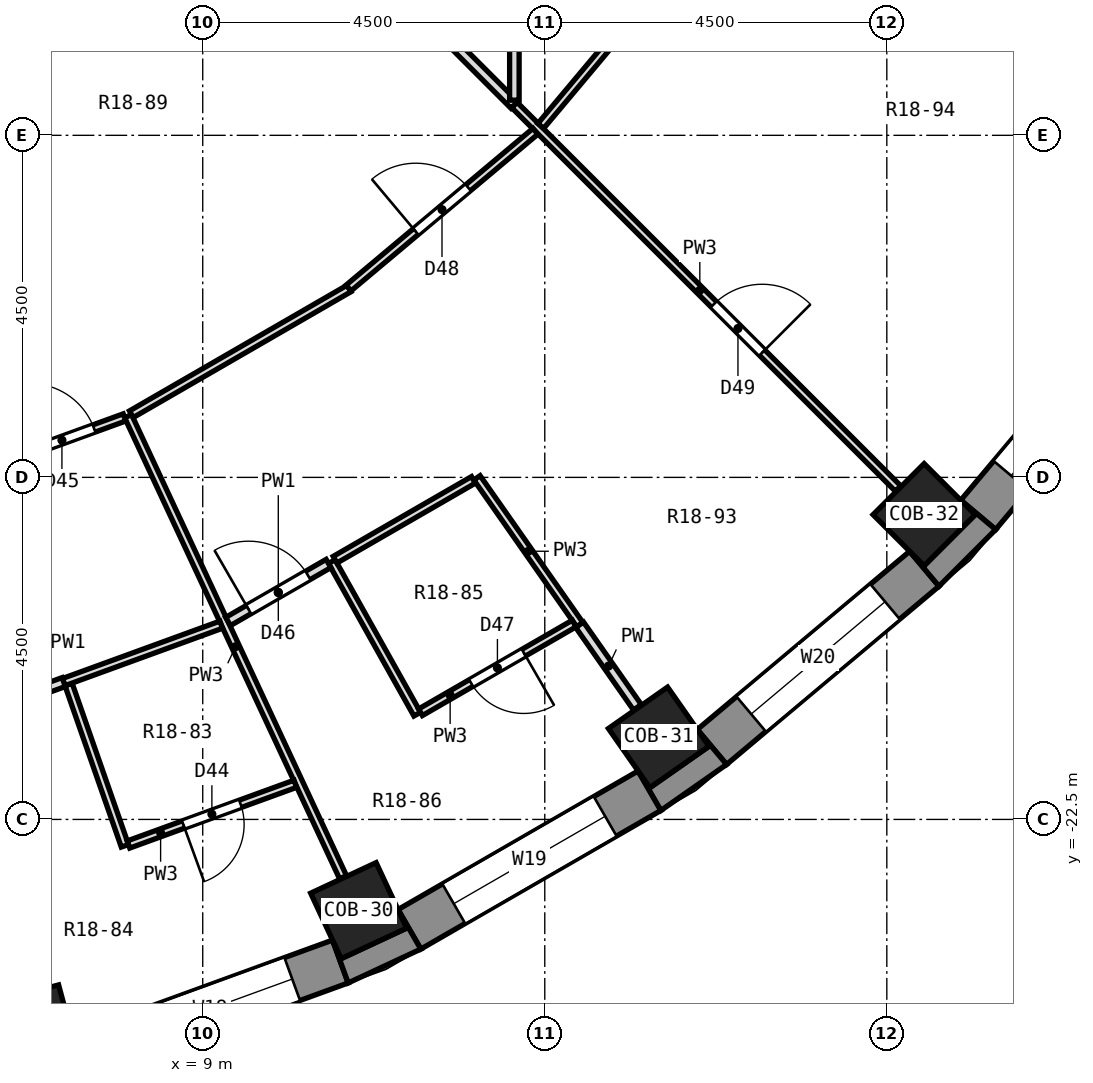
"""IFC4 building model, lengths in metres.
Left out: names, types, materials, properties, quantities, classifications, styles, units other than length and angle.
Written with IfcOpenShell. Run it as: python <this file> out.ifc"""

import sys

from ifc_helpers import new_model, si_unit, direction, frame, frame_2d, origin, origin_2d, place, context, subcontext, project, spatial, polyline, rectangle, outline, extrude, element, fill, save


model = new_model("IFC4")
c1 = context("Model", 3, precision=1e-05, world=origin(), true_north=direction((0.0, 1.0)))
c2 = subcontext(c1, "Body", "Model", "MODEL_VIEW")
j1 = project(units=[si_unit("LENGTHUNIT", "METRE"), si_unit("PLANEANGLEUNIT", "RADIAN")], contexts=[c1])
p1 = place(None, origin())
s1 = spatial("IfcSite", under=j1, at=p1, CompositionType="ELEMENT")
p2 = place(p1, origin())
s2 = spatial("IfcBuilding", under=s1, at=p2, CompositionType="ELEMENT")
p3 = place(p2, frame((0.0, 0.0, 101.8)))
s3 = spatial("IfcBuildingStorey", under=s2, at=p3, CompositionType="ELEMENT", Elevation=101.8)
for number, where, z_axis, x_axis in (
    (1, (6.768, -25.259, 0.0), (0.0, 0.0, 1.0), (0.259, -0.966, 0.0)),
    (2, (11.052, -23.7, 0.0), (0.0, 0.0, 1.0), (0.423, -0.906, 0.0)),
    (3, (14.999, -21.421, 0.0), (0.0, 0.0, 1.0), (0.574, -0.819, 0.0)),
    (4, (18.491, -18.491, 0.0), (0.0, 0.0, 1.0), (0.707, -0.707, 0.0)),
):
    element("IfcColumn", number, at=place(p3, frame(where, z_axis=z_axis, x_axis=x_axis)), inside=s3, PredefinedType="COLUMN", context=c2, shape_type="SweptSolid", body=[
        extrude(rectangle(XDim=0.95, YDim=0.95, at=origin_2d()), origin(), (0.0, 0.0, 1.0), 3.3),
    ])
p4 = place(p3, frame((7.383, -25.617, 0.0), z_axis=(0.0, 0.0, 1.0), x_axis=(0.939703505393, 0.341990236633, 0.0)))
e5 = element("IfcWall", 5, at=p4, inside=s3, PredefinedType="SOLIDWALL", context=c2, shape_type="SweptSolid", body=[
    extrude(rectangle(XDim=3.648, YDim=0.6, at=frame_2d((1.824, 0.0))), origin(), (0.0, 0.0, 1.0), 2.8),
])
p5 = place(p4, frame((0.674, 0.0, 0.9)))
e6 = element("IfcOpeningElement", 6, at=p5, cuts=e5, PredefinedType="OPENING", context=c2, shape_type="SweptSolid", body=[
    extrude(rectangle(XDim=2.3, YDim=1.8, at=frame_2d((1.15, 0.9))), frame((0.0, 0.312, 0.0), z_axis=(0.0, -1.0, 0.0), x_axis=(1.0, 0.0, 0.0)), (0.0, 0.0, 1.0), 0.624),
])
p6 = place(p3, frame((11.719, -23.946, 0.0), z_axis=(0.0, 0.0, 1.0), x_axis=(0.866051847062, 0.499954196102, 0.0)))
e7 = element("IfcWall", 7, at=p6, inside=s3, PredefinedType="SOLIDWALL", context=c2, shape_type="SweptSolid", body=[
    extrude(rectangle(XDim=3.648, YDim=0.6, at=frame_2d((1.824, 0.0))), origin(), (0.0, 0.0, 1.0), 2.8),
])
p7 = place(p6, frame((0.674, 0.0, 0.9)))
e8 = element("IfcOpeningElement", 8, at=p7, cuts=e7, PredefinedType="OPENING", context=c2, shape_type="SweptSolid", body=[
    extrude(rectangle(XDim=2.3, YDim=1.8, at=frame_2d((1.15, 0.9))), frame((0.0, 0.312, 0.0), z_axis=(0.0, -1.0, 0.0), x_axis=(1.0, 0.0, 0.0)), (0.0, 0.0, 1.0), 0.624),
])
p8 = place(p3, frame((15.699, -21.547, 0.0), z_axis=(0.0, 0.0, 1.0), x_axis=(0.766055462616, 0.642774476932, 0.0)))
e9 = element("IfcWall", 9, at=p8, inside=s3, PredefinedType="SOLIDWALL", context=c2, shape_type="SweptSolid", body=[
    extrude(rectangle(XDim=3.648, YDim=0.6, at=frame_2d((1.824, 0.0))), origin(), (0.0, 0.0, 1.0), 2.8),
])
p9 = place(p8, frame((0.674, 0.0, 0.9)))
e10 = element("IfcOpeningElement", 10, at=p9, cuts=e9, PredefinedType="OPENING", context=c2, shape_type="SweptSolid", body=[
    extrude(rectangle(XDim=2.3, YDim=1.8, at=frame_2d((1.15, 0.9))), frame((0.0, 0.312, 0.0), z_axis=(0.0, -1.0, 0.0), x_axis=(1.0, 0.0, 0.0)), (0.0, 0.0, 1.0), 0.624),
])
p10 = place(p3, frame((19.202, -18.494, 0.0), z_axis=(0.0, 0.0, 1.0), x_axis=(0.642774476932, 0.766055462616, 0.0)))
e11 = element("IfcWall", 11, at=p10, inside=s3, PredefinedType="SOLIDWALL", context=c2, shape_type="SweptSolid", body=[
    extrude(rectangle(XDim=3.648, YDim=0.6, at=frame_2d((1.824, 0.0))), origin(), (0.0, 0.0, 1.0), 2.8),
])
p11 = place(p10, frame((0.674, 0.0, 0.9)))
e12 = element("IfcOpeningElement", 12, at=p11, cuts=e11, PredefinedType="OPENING", context=c2, shape_type="SweptSolid", body=[
    extrude(rectangle(XDim=2.3, YDim=1.8, at=frame_2d((1.15, 0.9))), frame((0.0, 0.312, 0.0), z_axis=(0.0, -1.0, 0.0), x_axis=(1.0, 0.0, 0.0)), (0.0, 0.0, 1.0), 0.624),
])
p12 = place(p3, origin())
e13 = element("IfcWall", 13, at=p12, inside=s3, PredefinedType="SOLIDWALL", context=c2, shape_type="SweptSolid", body=[
    extrude(outline(polyline([(10.913, -24.651), (11.869, -24.206), (11.569, -23.686), (11.683, -23.93), (10.822, -24.331), (10.708, -24.087), (10.913, -24.651)])), origin(), (0.0, 0.0, 1.0), 2.8),
])
p13 = place(p3, origin())
e14 = element("IfcWall", 14, at=p13, inside=s3, PredefinedType="SOLIDWALL", context=c2, shape_type="SweptSolid", body=[
    extrude(outline(polyline([(15.892, -21.777), (15.506, -21.317), (15.661, -21.538), (14.882, -22.083), (14.728, -21.862), (15.028, -22.382), (15.892, -21.777)])), origin(), (0.0, 0.0, 1.0), 2.8),
])
p14 = place(p3, origin())
e15 = element("IfcWall", 15, at=p14, inside=s3, PredefinedType="SOLIDWALL", context=c2, shape_type="SweptSolid", body=[
    extrude(outline(polyline([(18.686, -19.432), (19.432, -18.686), (18.972, -18.301), (19.163, -18.491), (18.491, -19.163), (18.301, -18.972), (18.686, -19.432)])), origin(), (0.0, 0.0, 1.0), 2.8),
])
p15 = place(p3, frame((7.234, -20.723, 0.0), z_axis=(0.0, 0.0, 1.0), x_axis=(0.329707399535, -0.944083169372, 0.0)))
e16 = element("IfcWall", 16, at=p15, inside=s3, PredefinedType="PARTITIONING", context=c2, shape_type="SweptSolid", body=[
    extrude(rectangle(XDim=2.25, YDim=0.1, at=frame_2d((1.125, 0.0))), origin(), (0.0, 0.0, 1.0), 2.8),
])
p16 = place(p3, frame((8.018, -17.194, 0.0), z_axis=(0.0, 0.0, 1.0), x_axis=(0.422490057257, -0.906367558731, 0.0)))
e17 = element("IfcWall", 17, at=p16, inside=s3, PredefinedType="PARTITIONING", context=c2, shape_type="SweptSolid", body=[
    extrude(rectangle(XDim=6.693, YDim=0.1, at=frame_2d((3.347, 0.0))), origin(), (0.0, 0.0, 1.0), 2.8),
])
p17 = place(p3, frame((10.698, -19.108, 0.0), z_axis=(0.0, 0.0, 1.0), x_axis=(0.488622759198, -0.872495157117, 0.0)))
e18 = element("IfcWall", 18, at=p17, inside=s3, PredefinedType="PARTITIONING", context=c2, shape_type="SweptSolid", body=[
    extrude(rectangle(XDim=2.3, YDim=0.1, at=frame_2d((1.15, 0.0))), origin(), (0.0, 0.0, 1.0), 2.8),
])
p18 = place(p3, frame((12.608, -18.006, 0.0), z_axis=(0.0, 0.0, 1.0), x_axis=(0.573573515593, -0.819154089418, 0.0)))
e19 = element("IfcWall", 19, at=p18, inside=s3, PredefinedType="PARTITIONING", context=c2, shape_type="SweptSolid", body=[
    extrude(rectangle(XDim=2.358, YDim=0.1, at=frame_2d((1.179, 0.0))), origin(), (0.0, 0.0, 1.0), 2.8),
])
p19 = place(p3, frame((13.958, -19.939, 0.0), z_axis=(0.0, 0.0, 1.0), x_axis=(0.573511785482, -0.819197309513, 0.0)))
e20 = element("IfcWall", 20, at=p19, inside=s3, PredefinedType="PARTITIONING", context=c2, shape_type="SweptSolid", body=[
    extrude(rectangle(XDim=1.326, YDim=0.125, at=frame_2d((0.663, 0.0))), origin(), (0.0, 0.0, 1.0), 2.8),
])
p20 = place(p3, frame((13.1, -13.1, 0.0), z_axis=(0.0, 0.0, 1.0), x_axis=(0.707192272448, -0.707021279588, 0.0)))
e21 = element("IfcWall", 21, at=p20, inside=s3, PredefinedType="PARTITIONING", context=c2, shape_type="SweptSolid", body=[
    extrude(rectangle(XDim=7.139, YDim=0.1, at=frame_2d((3.569, 0.0))), origin(), (0.0, 0.0, 1.0), 2.8),
])
p21 = place(p20, frame((3.71, 0.0, 0.0)))
e22 = element("IfcOpeningElement", 22, at=p21, cuts=e21, PredefinedType="OPENING", context=c2, shape_type="SweptSolid", body=[
    extrude(rectangle(XDim=0.9, YDim=2.1, at=frame_2d((0.45, 1.05))), frame((0.0, 0.062, 0.0), z_axis=(0.0, -1.0, 0.0), x_axis=(1.0, 0.0, 0.0)), (0.0, 0.0, 1.0), 0.124),
])
p22 = place(p3, frame((8.092, -8.092, 0.0), z_axis=(0.0, 0.0, 1.0), x_axis=(0.707106781187, -0.707106781187, 0.0)))
e23 = element("IfcWall", 23, at=p22, inside=s3, PredefinedType="PARTITIONING", context=c2, shape_type="SweptSolid", body=[
    extrude(rectangle(XDim=7.083, YDim=0.125, at=frame_2d((3.541, 0.0))), origin(), (0.0, 0.0, 1.0), 2.8),
])
p23 = place(p3, frame((8.023, -22.83, 0.0), z_axis=(0.0, 0.0, 1.0), x_axis=(0.939707949959, 0.341978023831, 0.0)))
e24 = element("IfcWall", 24, at=p23, inside=s3, PredefinedType="PARTITIONING", context=c2, shape_type="SweptSolid", body=[
    extrude(rectangle(XDim=2.336, YDim=0.1, at=frame_2d((1.168, 0.0))), origin(), (0.0, 0.0, 1.0), 2.8),
])
p24 = place(p23, frame((0.768, 0.0, 0.0)))
e25 = element("IfcOpeningElement", 25, at=p24, cuts=e24, PredefinedType="OPENING", context=c2, shape_type="SweptSolid", body=[
    extrude(rectangle(XDim=0.8, YDim=2.1, at=frame_2d((0.4, 1.05))), frame((0.0, 0.062, 0.0), z_axis=(0.0, -1.0, 0.0), x_axis=(1.0, 0.0, 0.0)), (0.0, 0.0, 1.0), 0.124),
])
p25 = place(p3, frame((7.171, -20.693, 0.0), z_axis=(0.0, 0.0, 1.0), x_axis=(0.939573404597, 0.342347509665, 0.0)))
e26 = element("IfcWall", 26, at=p25, inside=s3, PredefinedType="PARTITIONING", context=c2, shape_type="SweptSolid", body=[
    extrude(rectangle(XDim=2.205, YDim=0.1, at=frame_2d((1.103, 0.0))), origin(), (0.0, 0.0, 1.0), 2.8),
])
p26 = place(p3, frame((5.736, -21.215, 0.0), z_axis=(0.0, 0.0, 1.0), x_axis=(0.939798092341, 0.34173022347, 0.0)))
e27 = element("IfcWall", 27, at=p26, inside=s3, PredefinedType="PARTITIONING", context=c2, shape_type="SweptSolid", body=[
    extrude(rectangle(XDim=1.527, YDim=0.125, at=frame_2d((0.763, 0.0))), origin(), (0.0, 0.0, 1.0), 2.8),
])
p27 = place(p26, frame((0.314, 0.0, 0.0)))
e28 = element("IfcOpeningElement", 28, at=p27, cuts=e27, PredefinedType="OPENING", context=c2, shape_type="SweptSolid", body=[
    extrude(rectangle(XDim=0.9, YDim=2.1, at=frame_2d((0.45, 1.05))), frame((0.0, 0.074, 0.0), z_axis=(0.0, -1.0, 0.0), x_axis=(1.0, 0.0, 0.0)), (0.0, 0.0, 1.0), 0.149),
])
p28 = place(p3, frame((6.324, -17.81, 0.0), z_axis=(0.0, 0.0, 1.0), x_axis=(0.939842226204, 0.341608825771, 0.0)))
e29 = element("IfcWall", 29, at=p28, inside=s3, PredefinedType="PARTITIONING", context=c2, shape_type="SweptSolid", body=[
    extrude(rectangle(XDim=1.752, YDim=0.1, at=frame_2d((0.876, 0.0))), origin(), (0.0, 0.0, 1.0), 2.8),
])
p29 = place(p28, frame((0.426, 0.0, 0.0)))
e30 = element("IfcOpeningElement", 30, at=p29, cuts=e29, PredefinedType="OPENING", context=c2, shape_type="SweptSolid", body=[
    extrude(rectangle(XDim=0.9, YDim=2.1, at=frame_2d((0.45, 1.05))), frame((0.0, 0.062, 0.0), z_axis=(0.0, -1.0, 0.0), x_axis=(1.0, 0.0, 0.0)), (0.0, 0.0, 1.0), 0.124),
])
p30 = place(p3, frame((11.865, -21.09, 0.0), z_axis=(0.0, 0.0, 1.0), x_axis=(0.866046247233, 0.49996389635, 0.0)))
e31 = element("IfcWall", 31, at=p30, inside=s3, PredefinedType="PARTITIONING", context=c2, shape_type="SweptSolid", body=[
    extrude(rectangle(XDim=2.334, YDim=0.1, at=frame_2d((1.167, 0.0))), origin(), (0.0, 0.0, 1.0), 2.8),
])
p31 = place(p30, frame((0.768, 0.0, 0.0)))
e32 = element("IfcOpeningElement", 32, at=p31, cuts=e31, PredefinedType="OPENING", context=c2, shape_type="SweptSolid", body=[
    extrude(rectangle(XDim=0.8, YDim=2.1, at=frame_2d((0.4, 1.05))), frame((0.0, 0.062, 0.0), z_axis=(0.0, -1.0, 0.0), x_axis=(1.0, 0.0, 0.0)), (0.0, 0.0, 1.0), 0.124),
])
p32 = place(p3, frame((10.741, -19.083, 0.0), z_axis=(0.0, 0.0, 1.0), x_axis=(0.86618365172, 0.499725806311, 0.0)))
e33 = element("IfcWall", 33, at=p32, inside=s3, PredefinedType="PARTITIONING", context=c2, shape_type="SweptSolid", body=[
    extrude(rectangle(XDim=2.101, YDim=0.1, at=frame_2d((1.051, 0.0))), origin(), (0.0, 0.0, 1.0), 2.8),
])
p33 = place(p3, frame((9.333, -19.896, 0.0), z_axis=(0.0, 0.0, 1.0), x_axis=(0.86603905187, 0.499976360077, 0.0)))
e34 = element("IfcWall", 34, at=p33, inside=s3, PredefinedType="PARTITIONING", context=c2, shape_type="SweptSolid", body=[
    extrude(rectangle(XDim=1.526, YDim=0.125, at=frame_2d((0.763, 0.0))), origin(), (0.0, 0.0, 1.0), 2.8),
])
p34 = place(p33, frame((0.313, 0.0, 0.0)))
e35 = element("IfcOpeningElement", 35, at=p34, cuts=e34, PredefinedType="OPENING", context=c2, shape_type="SweptSolid", body=[
    extrude(rectangle(XDim=0.9, YDim=2.1, at=frame_2d((0.45, 1.05))), frame((0.0, 0.074, 0.0), z_axis=(0.0, -1.0, 0.0), x_axis=(1.0, 0.0, 0.0)), (0.0, 0.0, 1.0), 0.149),
])
p35 = place(p3, frame((8.061, -17.169, 0.0), z_axis=(0.0, 0.0, 1.0), x_axis=(0.865907705821, 0.500203803465, 0.0)))
e36 = element("IfcWall", 36, at=p35, inside=s3, PredefinedType="PARTITIONING", context=c2, shape_type="SweptSolid", body=[
    extrude(rectangle(XDim=3.307, YDim=0.1, at=frame_2d((1.654, 0.0))), origin(), (0.0, 0.0, 1.0), 2.8),
])
p36 = place(p3, frame((10.919, -15.508, 0.0), z_axis=(0.0, 0.0, 1.0), x_axis=(0.766214515486, 0.642584870861, 0.0)))
e37 = element("IfcWall", 37, at=p36, inside=s3, PredefinedType="PARTITIONING", context=c2, shape_type="SweptSolid", body=[
    extrude(rectangle(XDim=3.207, YDim=0.1, at=frame_2d((1.604, 0.0))), origin(), (0.0, 0.0, 1.0), 2.8),
])
p37 = place(p36, frame((1.154, 0.0, 0.0)))
e38 = element("IfcOpeningElement", 38, at=p37, cuts=e37, PredefinedType="OPENING", context=c2, shape_type="SweptSolid", body=[
    extrude(rectangle(XDim=0.9, YDim=2.1, at=frame_2d((0.45, 1.05))), frame((0.0, 0.062, 0.0), z_axis=(0.0, -1.0, 0.0), x_axis=(1.0, 0.0, 0.0)), (0.0, 0.0, 1.0), 0.124),
])
p38 = place(p3, frame((13.447, -13.377, 0.0), z_axis=(0.0, 0.0, 1.0), x_axis=(0.642547967595, 0.76624546285, 0.0)))
e39 = element("IfcWall", 39, at=p38, inside=s3, PredefinedType="PARTITIONING", context=c2, shape_type="SweptSolid", body=[
    extrude(rectangle(XDim=3.308, YDim=0.1, at=frame_2d((1.654, 0.0))), origin(), (0.0, 0.0, 1.0), 2.8),
])
p39 = place(p3, frame((13.1, -13.038, 0.0), z_axis=(0.0, 0.0, 1.0), x_axis=(0.0, 1.0, 0.0)))
e40 = element("IfcWall", 40, at=p39, inside=s3, PredefinedType="PARTITIONING", context=c2, shape_type="SweptSolid", body=[
    extrude(rectangle(XDim=3.638, YDim=0.125, at=frame_2d((1.819, 0.0))), origin(), (0.0, 0.0, 1.0), 2.8),
])
p40 = place(p5, origin())
e41 = element("IfcWindow", 41, at=p40, inside=s3, PartitioningType="SINGLE_PANEL", PredefinedType="WINDOW", context=c2, shape_type="SweptSolid", body=[
    extrude(rectangle(XDim=2.3, YDim=1.8, at=frame_2d((1.15, 0.9))), frame((0.0, 0.18, 0.0), z_axis=(0.0, -1.0, 0.0), x_axis=(1.0, 0.0, 0.0)), (0.0, 0.0, 1.0), 0.06),
])
fill(e6, e41)
p41 = place(p7, origin())
e42 = element("IfcWindow", 42, at=p41, inside=s3, PartitioningType="SINGLE_PANEL", PredefinedType="WINDOW", context=c2, shape_type="SweptSolid", body=[
    extrude(rectangle(XDim=2.3, YDim=1.8, at=frame_2d((1.15, 0.9))), frame((0.0, 0.18, 0.0), z_axis=(0.0, -1.0, 0.0), x_axis=(1.0, 0.0, 0.0)), (0.0, 0.0, 1.0), 0.06),
])
fill(e8, e42)
p42 = place(p9, origin())
e43 = element("IfcWindow", 43, at=p42, inside=s3, PartitioningType="SINGLE_PANEL", PredefinedType="WINDOW", context=c2, shape_type="SweptSolid", body=[
    extrude(rectangle(XDim=2.3, YDim=1.8, at=frame_2d((1.15, 0.9))), frame((0.0, 0.18, 0.0), z_axis=(0.0, -1.0, 0.0), x_axis=(1.0, 0.0, 0.0)), (0.0, 0.0, 1.0), 0.06),
])
fill(e10, e43)
p43 = place(p11, origin())
e44 = element("IfcWindow", 44, at=p43, inside=s3, PartitioningType="SINGLE_PANEL", PredefinedType="WINDOW", context=c2, shape_type="SweptSolid", body=[
    extrude(rectangle(XDim=2.3, YDim=1.8, at=frame_2d((1.15, 0.9))), frame((0.0, 0.18, 0.0), z_axis=(0.0, -1.0, 0.0), x_axis=(1.0, 0.0, 0.0)), (0.0, 0.0, 1.0), 0.06),
])
fill(e12, e44)
p44 = place(p24, frame((0.8, 0.0, 0.0), z_axis=(0.0, 0.0, 1.0), x_axis=(-1.0, 0.0, 0.0)))
e45 = element("IfcDoor", 45, at=p44, inside=s3, OperationType="SINGLE_SWING_RIGHT", PredefinedType="DOOR", context=c2, shape_type="SweptSolid", body=[
    extrude(rectangle(XDim=0.8, YDim=2.1, at=frame_2d((0.4, 1.05))), frame((0.0, 0.025, 0.0), z_axis=(0.0, -1.0, 0.0), x_axis=(1.0, 0.0, 0.0)), (0.0, 0.0, 1.0), 0.05),
])
fill(e25, e45)
p45 = place(p29, origin())
e46 = element("IfcDoor", 46, at=p45, inside=s3, OperationType="SINGLE_SWING_LEFT", PredefinedType="DOOR", context=c2, shape_type="SweptSolid", body=[
    extrude(rectangle(XDim=0.9, YDim=2.1, at=frame_2d((0.45, 1.05))), frame((0.0, 0.025, 0.0), z_axis=(0.0, -1.0, 0.0), x_axis=(1.0, 0.0, 0.0)), (0.0, 0.0, 1.0), 0.05),
])
fill(e30, e46)
p46 = place(p34, origin())
e47 = element("IfcDoor", 47, at=p46, inside=s3, OperationType="SINGLE_SWING_LEFT", PredefinedType="DOOR", context=c2, shape_type="SweptSolid", body=[
    extrude(rectangle(XDim=0.9, YDim=2.1, at=frame_2d((0.45, 1.05))), frame((0.0, 0.025, 0.0), z_axis=(0.0, -1.0, 0.0), x_axis=(1.0, 0.0, 0.0)), (0.0, 0.0, 1.0), 0.05),
])
fill(e35, e47)
p47 = place(p31, frame((0.8, 0.0, 0.0), z_axis=(0.0, 0.0, 1.0), x_axis=(-1.0, 0.0, 0.0)))
e48 = element("IfcDoor", 48, at=p47, inside=s3, OperationType="SINGLE_SWING_LEFT", PredefinedType="DOOR", context=c2, shape_type="SweptSolid", body=[
    extrude(rectangle(XDim=0.8, YDim=2.1, at=frame_2d((0.4, 1.05))), frame((0.0, 0.025, 0.0), z_axis=(0.0, -1.0, 0.0), x_axis=(1.0, 0.0, 0.0)), (0.0, 0.0, 1.0), 0.05),
])
fill(e32, e48)
p48 = place(p37, origin())
e49 = element("IfcDoor", 49, at=p48, inside=s3, OperationType="SINGLE_SWING_LEFT", PredefinedType="DOOR", context=c2, shape_type="SweptSolid", body=[
    extrude(rectangle(XDim=0.9, YDim=2.1, at=frame_2d((0.45, 1.05))), frame((0.0, 0.025, 0.0), z_axis=(0.0, -1.0, 0.0), x_axis=(1.0, 0.0, 0.0)), (0.0, 0.0, 1.0), 0.05),
])
fill(e38, e49)
p49 = place(p21, origin())
e50 = element("IfcDoor", 50, at=p49, inside=s3, OperationType="SINGLE_SWING_RIGHT", PredefinedType="DOOR", context=c2, shape_type="SweptSolid", body=[
    extrude(rectangle(XDim=0.9, YDim=2.1, at=frame_2d((0.45, 1.05))), frame((0.0, 0.025, 0.0), z_axis=(0.0, -1.0, 0.0), x_axis=(1.0, 0.0, 0.0)), (0.0, 0.0, 1.0), 0.05),
])
fill(e22, e50)
save(model, sys.argv[1])
